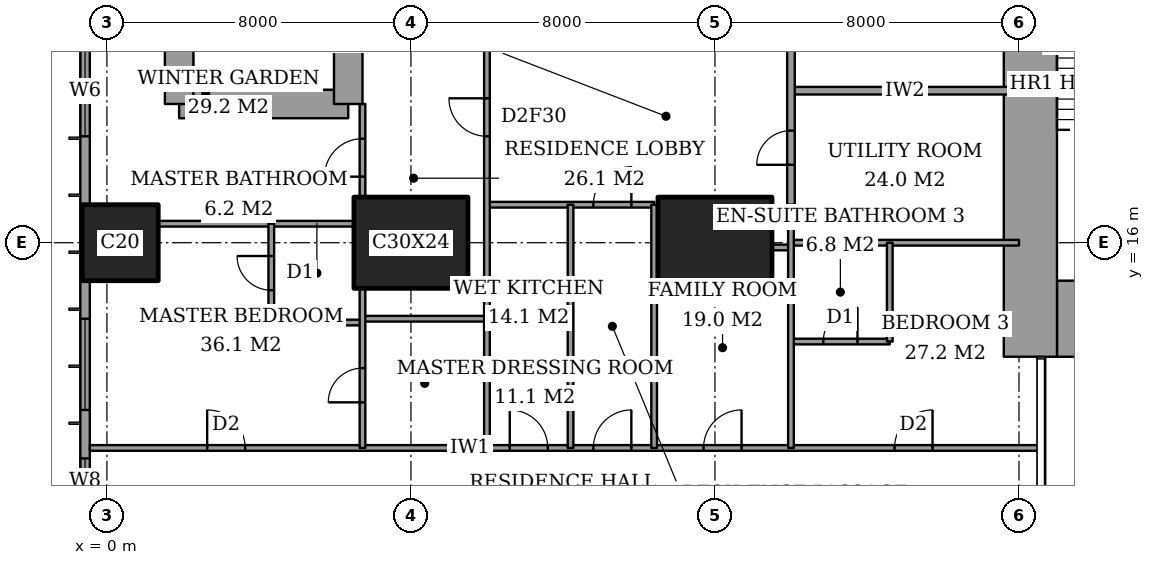
"""IFC4 building model, lengths in metres.
Left out: names, types, materials, properties, quantities, classifications, styles, units other than length and angle.
Written with IfcOpenShell. Run it as: python <this file> out.ifc"""

import sys

from ifc_helpers import new_model, si_unit, direction, frame, frame_2d, origin, origin_2d, place, context, subcontext, project, spatial, rectangle, extrude, element, fill, save


model = new_model("IFC4")
c1 = context("Model", 3, precision=1e-05, world=origin(), true_north=direction((0.0, 1.0)))
c2 = subcontext(c1, "Body", "Model", "MODEL_VIEW")
j1 = project(units=[si_unit("LENGTHUNIT", "METRE"), si_unit("PLANEANGLEUNIT", "RADIAN")], contexts=[c1])
p1 = place(None, origin())
s1 = spatial("IfcSite", under=j1, at=p1, CompositionType="ELEMENT")
p2 = place(p1, origin())
s2 = spatial("IfcBuilding", under=s1, at=p2, CompositionType="ELEMENT")
p3 = place(p2, frame((0.0, 0.0, 47.6)))
s3 = spatial("IfcBuildingStorey", under=s2, at=p3, CompositionType="ELEMENT", Elevation=47.6)
p4 = place(p3, frame((0.35, 16.0, 0.0), z_axis=(0.0, 0.0, 1.0), x_axis=(1.0, 0.0, 0.0)))
e1 = element("IfcColumn", 1, at=p4, inside=s3, PredefinedType="COLUMN", context=c2, shape_type="SweptSolid", body=[
    extrude(rectangle(XDim=2.0, YDim=2.0, at=origin_2d()), origin(), (0.0, 0.0, 1.0), 3.6),
])
for number, where, z_axis, x_axis in (
    (2, (8.0, 16.0, 0.0), (0.0, 0.0, 1.0), (1.0, 0.0, 0.0)),
    (3, (16.0, 16.0, 0.0), (0.0, 0.0, 1.0), (1.0, 0.0, 0.0)),
):
    element("IfcColumn", number, at=place(p3, frame(where, z_axis=z_axis, x_axis=x_axis)), inside=s3, PredefinedType="COLUMN", context=c2, shape_type="SweptSolid", body=[
        extrude(rectangle(XDim=3.0, YDim=2.4, at=origin_2d()), origin(), (0.0, 0.0, 1.0), 3.6),
    ])
p5 = place(p3, frame((25.0, 14.0, 0.0), z_axis=(0.0, 0.0, 1.0), x_axis=(1.0, 0.0, 0.0)))
e4 = element("IfcWall", 4, at=p5, inside=s3, PredefinedType="SHEAR", context=c2, shape_type="SweptSolid", body=[
    extrude(rectangle(XDim=3.15, YDim=2.0, at=frame_2d((1.575, 0.0))), origin(), (0.0, 0.0, 1.0), 3.6),
])
p6 = place(p3, frame((24.3, 13.0, 0.0), z_axis=(0.0, 0.0, 1.0), x_axis=(0.0, 1.0, 0.0)))
e5 = element("IfcWall", 5, at=p6, inside=s3, PredefinedType="SHEAR", context=c2, shape_type="SweptSolid", body=[
    extrude(rectangle(XDim=10.15, YDim=1.4, at=frame_2d((5.075, 0.0))), origin(), (0.0, 0.0, 1.0), 3.6),
])
p7 = place(p3, frame((1.9, 19.65, 0.0), z_axis=(0.0, 0.0, 1.0), x_axis=(1.0, 0.0, 0.0)))
e6 = element("IfcWall", 6, at=p7, inside=s3, PredefinedType="SHEAR", context=c2, shape_type="SweptSolid", body=[
    extrude(rectangle(XDim=4.45, YDim=0.75, at=frame_2d((2.225, 0.0))), origin(), (0.0, 0.0, 1.0), 3.6),
])
p8 = place(p3, frame((6.35, 19.65, 0.0), z_axis=(0.0, 0.0, 1.0), x_axis=(0.0, 1.0, 0.0)))
e7 = element("IfcWall", 7, at=p8, inside=s3, PredefinedType="SHEAR", context=c2, shape_type="SweptSolid", body=[
    extrude(rectangle(XDim=8.7, YDim=0.75, at=frame_2d((4.35, 0.0))), origin(), (0.0, 0.0, 1.0), 3.6),
])
p9 = place(p8, frame((6.725, 0.0, 0.0)))
e8 = element("IfcOpeningElement", 8, at=p9, cuts=e7, PredefinedType="OPENING", context=c2, shape_type="SweptSolid", body=[
    extrude(rectangle(XDim=1.0, YDim=2.1, at=frame_2d((0.5, 1.05))), frame((0.0, 0.385, 0.0), z_axis=(0.0, -1.0, 0.0), x_axis=(1.0, 0.0, 0.0)), (0.0, 0.0, 1.0), 0.77),
])
p10 = place(p3, frame((1.9, 28.35, 0.0), z_axis=(0.0, 0.0, 1.0), x_axis=(0.0, -1.0, 0.0)))
e9 = element("IfcWall", 9, at=p10, inside=s3, PredefinedType="SHEAR", context=c2, shape_type="SweptSolid", body=[
    extrude(rectangle(XDim=8.7, YDim=0.75, at=frame_2d((4.35, 0.0))), origin(), (0.0, 0.0, 1.0), 3.6),
])
p11 = place(p3, frame((-0.575, 44.825, 0.0), z_axis=(0.0, 0.0, 1.0), x_axis=(0.0, -1.0, 0.0)))
e10 = element("IfcWall", 10, at=p11, inside=s3, PredefinedType="SOLIDWALL", context=c2, shape_type="SweptSolid", body=[
    extrude(rectangle(XDim=41.65, YDim=0.25, at=frame_2d((20.825, 0.0))), origin(), (0.0, 0.0, 1.0), 3.6),
])
p12 = place(p11, frame((0.775, 0.0, 0.6)))
e11 = element("IfcOpeningElement", 11, at=p12, cuts=e10, PredefinedType="OPENING", context=c2, shape_type="SweptSolid", body=[
    extrude(rectangle(XDim=2.4, YDim=2.0, at=frame_2d((1.2, 1.0))), frame((0.0, 0.135, 0.0), z_axis=(0.0, -1.0, 0.0), x_axis=(1.0, 0.0, 0.0)), (0.0, 0.0, 1.0), 0.27),
])
p13 = place(p11, frame((6.1, 0.0, 0.6)))
e12 = element("IfcOpeningElement", 12, at=p13, cuts=e10, PredefinedType="OPENING", context=c2, shape_type="SweptSolid", body=[
    extrude(rectangle(XDim=1.2, YDim=2.0, at=frame_2d((0.6, 1.0))), frame((0.0, 0.135, 0.0), z_axis=(0.0, -1.0, 0.0), x_axis=(1.0, 0.0, 0.0)), (0.0, 0.0, 1.0), 0.27),
])
p14 = place(p11, frame((8.425, 0.0, 0.6)))
e13 = element("IfcOpeningElement", 13, at=p14, cuts=e10, PredefinedType="OPENING", context=c2, shape_type="SweptSolid", body=[
    extrude(rectangle(XDim=2.4, YDim=2.0, at=frame_2d((1.2, 1.0))), frame((0.0, 0.135, 0.0), z_axis=(0.0, -1.0, 0.0), x_axis=(1.0, 0.0, 0.0)), (0.0, 0.0, 1.0), 0.27),
])
p15 = place(p11, frame((15.625, 0.0, 0.6)))
e14 = element("IfcOpeningElement", 14, at=p15, cuts=e10, PredefinedType="OPENING", context=c2, shape_type="SweptSolid", body=[
    extrude(rectangle(XDim=2.4, YDim=2.0, at=frame_2d((1.2, 1.0))), frame((0.0, 0.135, 0.0), z_axis=(0.0, -1.0, 0.0), x_axis=(1.0, 0.0, 0.0)), (0.0, 0.0, 1.0), 0.27),
])
p16 = place(p11, frame((23.625, 0.0, 0.6)))
e15 = element("IfcOpeningElement", 15, at=p16, cuts=e10, PredefinedType="OPENING", context=c2, shape_type="SweptSolid", body=[
    extrude(rectangle(XDim=2.4, YDim=2.0, at=frame_2d((1.2, 1.0))), frame((0.0, 0.135, 0.0), z_axis=(0.0, -1.0, 0.0), x_axis=(1.0, 0.0, 0.0)), (0.0, 0.0, 1.0), 0.27),
])
p17 = place(p11, frame((30.825, 0.0, 0.6)))
e16 = element("IfcOpeningElement", 16, at=p17, cuts=e10, PredefinedType="OPENING", context=c2, shape_type="SweptSolid", body=[
    extrude(rectangle(XDim=2.4, YDim=2.0, at=frame_2d((1.2, 1.0))), frame((0.0, 0.135, 0.0), z_axis=(0.0, -1.0, 0.0), x_axis=(1.0, 0.0, 0.0)), (0.0, 0.0, 1.0), 0.27),
])
p18 = place(p11, frame((34.5, 0.0, 0.6)))
e17 = element("IfcOpeningElement", 17, at=p18, cuts=e10, PredefinedType="OPENING", context=c2, shape_type="SweptSolid", body=[
    extrude(rectangle(XDim=1.2, YDim=2.0, at=frame_2d((0.6, 1.0))), frame((0.0, 0.135, 0.0), z_axis=(0.0, -1.0, 0.0), x_axis=(1.0, 0.0, 0.0)), (0.0, 0.0, 1.0), 0.27),
])
p19 = place(p11, frame((38.475, 0.0, 0.6)))
e18 = element("IfcOpeningElement", 18, at=p19, cuts=e10, PredefinedType="OPENING", context=c2, shape_type="SweptSolid", body=[
    extrude(rectangle(XDim=2.4, YDim=2.0, at=frame_2d((1.2, 1.0))), frame((0.0, 0.135, 0.0), z_axis=(0.0, -1.0, 0.0), x_axis=(1.0, 0.0, 0.0)), (0.0, 0.0, 1.0), 0.27),
])
p20 = place(p3, frame((-0.45, 10.6, 0.0), z_axis=(0.0, 0.0, 1.0), x_axis=(1.0, 0.0, 0.0)))
e19 = element("IfcWall", 19, at=p20, inside=s3, PredefinedType="PARTITIONING", context=c2, shape_type="SweptSolid", body=[
    extrude(rectangle(XDim=25.011, YDim=0.15, at=frame_2d((12.505, 0.0))), origin(), (0.0, 0.0, 1.0), 3.35),
])
p21 = place(p20, frame((13.25, 0.0, 0.0)))
e20 = element("IfcOpeningElement", 20, at=p21, cuts=e19, PredefinedType="OPENING", context=c2, shape_type="SweptSolid", body=[
    extrude(rectangle(XDim=1.0, YDim=2.1, at=frame_2d((0.5, 1.05))), frame((0.0, 0.085, 0.0), z_axis=(0.0, -1.0, 0.0), x_axis=(1.0, 0.0, 0.0)), (0.0, 0.0, 1.0), 0.17),
])
p22 = place(p20, frame((3.087, 0.0, 0.0)))
e21 = element("IfcOpeningElement", 21, at=p22, cuts=e19, PredefinedType="OPENING", context=c2, shape_type="SweptSolid", body=[
    extrude(rectangle(XDim=1.0, YDim=2.1, at=frame_2d((0.5, 1.05))), frame((0.0, 0.085, 0.0), z_axis=(0.0, -1.0, 0.0), x_axis=(1.0, 0.0, 0.0)), (0.0, 0.0, 1.0), 0.17),
])
p23 = place(p20, frame((11.05, 0.0, 0.0)))
e22 = element("IfcOpeningElement", 22, at=p23, cuts=e19, PredefinedType="OPENING", context=c2, shape_type="SweptSolid", body=[
    extrude(rectangle(XDim=1.0, YDim=2.1, at=frame_2d((0.5, 1.05))), frame((0.0, 0.085, 0.0), z_axis=(0.0, -1.0, 0.0), x_axis=(1.0, 0.0, 0.0)), (0.0, 0.0, 1.0), 0.17),
])
p24 = place(p20, frame((16.15, 0.0, 0.0)))
e23 = element("IfcOpeningElement", 23, at=p24, cuts=e19, PredefinedType="OPENING", context=c2, shape_type="SweptSolid", body=[
    extrude(rectangle(XDim=1.0, YDim=2.1, at=frame_2d((0.5, 1.05))), frame((0.0, 0.085, 0.0), z_axis=(0.0, -1.0, 0.0), x_axis=(1.0, 0.0, 0.0)), (0.0, 0.0, 1.0), 0.17),
])
p25 = place(p20, frame((21.175, 0.0, 0.0)))
e24 = element("IfcOpeningElement", 24, at=p25, cuts=e19, PredefinedType="OPENING", context=c2, shape_type="SweptSolid", body=[
    extrude(rectangle(XDim=1.0, YDim=2.1, at=frame_2d((0.5, 1.05))), frame((0.0, 0.085, 0.0), z_axis=(0.0, -1.0, 0.0), x_axis=(1.0, 0.0, 0.0)), (0.0, 0.0, 1.0), 0.17),
])
p26 = place(p3, frame((18.0, 13.4, 0.0), z_axis=(0.0, 0.0, 1.0), x_axis=(1.0, 0.0, 0.0)))
e25 = element("IfcWall", 25, at=p26, inside=s3, PredefinedType="PARTITIONING", context=c2, shape_type="SweptSolid", body=[
    extrude(rectangle(XDim=2.6, YDim=0.15, at=frame_2d((1.3, 0.0))), origin(), (0.0, 0.0, 1.0), 3.35),
])
p27 = place(p26, frame((0.85, 0.0, 0.0)))
e26 = element("IfcOpeningElement", 26, at=p27, cuts=e25, PredefinedType="OPENING", context=c2, shape_type="SweptSolid", body=[
    extrude(rectangle(XDim=0.9, YDim=2.1, at=frame_2d((0.45, 1.05))), frame((0.0, 0.085, 0.0), z_axis=(0.0, -1.0, 0.0), x_axis=(1.0, 0.0, 0.0)), (0.0, 0.0, 1.0), 0.17),
])
p28 = place(p3, frame((4.325, 13.9, 0.0), z_axis=(0.0, 0.0, 1.0), x_axis=(1.0, 0.0, 0.0)))
e27 = element("IfcWall", 27, at=p28, inside=s3, PredefinedType="PARTITIONING", context=c2, shape_type="SweptSolid", body=[
    extrude(rectangle(XDim=2.4, YDim=0.15, at=frame_2d((1.2, 0.0))), origin(), (0.0, 0.0, 1.0), 3.35),
])
p29 = place(p3, frame((6.725, 14.0, 0.0), z_axis=(0.0, 0.0, 1.0), x_axis=(1.0, 0.0, 0.0)))
e28 = element("IfcWall", 28, at=p29, inside=s3, PredefinedType="PARTITIONING", context=c2, shape_type="SweptSolid", body=[
    extrude(rectangle(XDim=3.275, YDim=0.15, at=frame_2d((1.637, 0.0))), origin(), (0.0, 0.0, 1.0), 3.35),
])
p30 = place(p3, frame((17.5, 15.875, 0.0), z_axis=(0.0, 0.0, 1.0), x_axis=(1.0, 0.0, 0.0)))
e29 = element("IfcWall", 29, at=p30, inside=s3, PredefinedType="PARTITIONING", context=c2, shape_type="SweptSolid", body=[
    extrude(rectangle(XDim=0.5, YDim=0.15, at=frame_2d((0.25, 0.0))), origin(), (0.0, 0.0, 1.0), 2.634),
])
p31 = place(p3, frame((18.0, 16.0, 0.0), z_axis=(0.0, 0.0, 1.0), x_axis=(1.0, 0.0, 0.0)))
e30 = element("IfcWall", 30, at=p31, inside=s3, PredefinedType="PARTITIONING", context=c2, shape_type="SweptSolid", body=[
    extrude(rectangle(XDim=6.0, YDim=0.15, at=frame_2d((3.0, 0.0))), origin(), (0.0, 0.0, 1.0), 2.634),
])
p32 = place(p3, frame((1.35, 16.5, 0.0), z_axis=(0.0, 0.0, 1.0), x_axis=(1.0, 0.0, 0.0)))
e31 = element("IfcWall", 31, at=p32, inside=s3, PredefinedType="PARTITIONING", context=c2, shape_type="SweptSolid", body=[
    extrude(rectangle(XDim=5.15, YDim=0.15, at=frame_2d((2.575, 0.0))), origin(), (0.0, 0.0, 1.0), 3.35),
])
p33 = place(p3, frame((10.0, 17.0, 0.0), z_axis=(0.0, 0.0, 1.0), x_axis=(1.0, 0.0, 0.0)))
e32 = element("IfcWall", 32, at=p33, inside=s3, PredefinedType="PARTITIONING", context=c2, shape_type="SweptSolid", body=[
    extrude(rectangle(XDim=4.4, YDim=0.15, at=frame_2d((2.2, 0.0))), origin(), (0.0, 0.0, 1.0), 3.35),
])
p34 = place(p33, frame((2.8, 0.0, 0.0)))
e33 = element("IfcOpeningElement", 33, at=p34, cuts=e32, PredefinedType="OPENING", context=c2, shape_type="SweptSolid", body=[
    extrude(rectangle(XDim=1.0, YDim=2.1, at=frame_2d((0.5, 1.05))), frame((0.0, 0.085, 0.0), z_axis=(0.0, -1.0, 0.0), x_axis=(1.0, 0.0, 0.0)), (0.0, 0.0, 1.0), 0.17),
])
p35 = place(p3, frame((18.0, 20.0, 0.0), z_axis=(0.0, 0.0, 1.0), x_axis=(1.0, 0.0, 0.0)))
e34 = element("IfcWall", 34, at=p35, inside=s3, PredefinedType="PARTITIONING", context=c2, shape_type="SweptSolid", body=[
    extrude(rectangle(XDim=6.0, YDim=0.2, at=frame_2d((3.0, 0.0))), origin(), (0.0, 0.0, 1.0), 3.35),
])
p36 = place(p3, frame((4.325, 13.9, 0.0), z_axis=(0.0, 0.0, 1.0), x_axis=(0.0, 1.0, 0.0)))
e35 = element("IfcWall", 35, at=p36, inside=s3, PredefinedType="PARTITIONING", context=c2, shape_type="SweptSolid", body=[
    extrude(rectangle(XDim=2.6, YDim=0.15, at=frame_2d((1.3, 0.0))), origin(), (0.0, 0.0, 1.0), 3.35),
])
p37 = place(p36, frame((0.85, 0.0, 0.0)))
e36 = element("IfcOpeningElement", 36, at=p37, cuts=e35, PredefinedType="OPENING", context=c2, shape_type="SweptSolid", body=[
    extrude(rectangle(XDim=0.9, YDim=2.1, at=frame_2d((0.45, 1.05))), frame((0.0, 0.085, 0.0), z_axis=(0.0, -1.0, 0.0), x_axis=(1.0, 0.0, 0.0)), (0.0, 0.0, 1.0), 0.17),
])
p38 = place(p3, frame((6.725, 10.6, 0.0), z_axis=(0.0, 0.0, 1.0), x_axis=(0.0, 1.0, 0.0)))
e37 = element("IfcWall", 37, at=p38, inside=s3, PredefinedType="PARTITIONING", context=c2, shape_type="SweptSolid", body=[
    extrude(rectangle(XDim=4.2, YDim=0.15, at=frame_2d((2.1, 0.0))), origin(), (0.0, 0.0, 1.0), 3.35),
])
p39 = place(p38, frame((1.2, 0.0, 0.0)))
e38 = element("IfcOpeningElement", 38, at=p39, cuts=e37, PredefinedType="OPENING", context=c2, shape_type="SweptSolid", body=[
    extrude(rectangle(XDim=0.9, YDim=2.1, at=frame_2d((0.45, 1.05))), frame((0.0, 0.085, 0.0), z_axis=(0.0, -1.0, 0.0), x_axis=(1.0, 0.0, 0.0)), (0.0, 0.0, 1.0), 0.17),
])
p40 = place(p3, frame((6.725, 17.2, 0.0), z_axis=(0.0, 0.0, 1.0), x_axis=(0.0, 1.0, 0.0)))
e39 = element("IfcWall", 39, at=p40, inside=s3, PredefinedType="PARTITIONING", context=c2, shape_type="SweptSolid", body=[
    extrude(rectangle(XDim=2.45, YDim=0.15, at=frame_2d((1.225, 0.0))), origin(), (0.0, 0.0, 1.0), 3.35),
])
p41 = place(p40, frame((0.538, 0.0, 0.0)))
e40 = element("IfcOpeningElement", 40, at=p41, cuts=e39, PredefinedType="OPENING", context=c2, shape_type="SweptSolid", body=[
    extrude(rectangle(XDim=1.0, YDim=2.1, at=frame_2d((0.5, 1.05))), frame((0.0, 0.085, 0.0), z_axis=(0.0, -1.0, 0.0), x_axis=(1.0, 0.0, 0.0)), (0.0, 0.0, 1.0), 0.17),
])
p42 = place(p3, frame((10.0, 10.6, 0.0), z_axis=(0.0, 0.0, 1.0), x_axis=(0.0, 1.0, 0.0)))
e41 = element("IfcWall", 41, at=p42, inside=s3, PredefinedType="PARTITIONING", context=c2, shape_type="SweptSolid", body=[
    extrude(rectangle(XDim=11.0, YDim=0.15, at=frame_2d((5.5, 0.0))), origin(), (0.0, 0.0, 1.0), 3.35),
])
p43 = place(p42, frame((8.2, 0.0, 0.0)))
e42 = element("IfcOpeningElement", 42, at=p43, cuts=e41, PredefinedType="OPENING", context=c2, shape_type="SweptSolid", body=[
    extrude(rectangle(XDim=1.0, YDim=2.1, at=frame_2d((0.5, 1.05))), frame((0.0, 0.085, 0.0), z_axis=(0.0, -1.0, 0.0), x_axis=(1.0, 0.0, 0.0)), (0.0, 0.0, 1.0), 0.17),
])
for number, where, z_axis, x_axis in (
    (43, (12.2, 10.6, 0.0), (0.0, 0.0, 1.0), (0.0, 1.0, 0.0)),
    (44, (14.4, 10.6, 0.0), (0.0, 0.0, 1.0), (0.0, 1.0, 0.0)),
):
    element("IfcWall", number, at=place(p3, frame(where, z_axis=z_axis, x_axis=x_axis)), inside=s3, PredefinedType="PARTITIONING", context=c2, shape_type="SweptSolid", body=[
        extrude(rectangle(XDim=6.4, YDim=0.15, at=frame_2d((3.2, 0.0))), origin(), (0.0, 0.0, 1.0), 3.35),
    ])
p44 = place(p3, frame((18.0, 17.0, 0.0), z_axis=(0.0, 0.0, 1.0), x_axis=(0.0, 1.0, 0.0)))
e45 = element("IfcWall", 45, at=p44, inside=s3, PredefinedType="PARTITIONING", context=c2, shape_type="SweptSolid", body=[
    extrude(rectangle(XDim=7.0, YDim=0.2, at=frame_2d((3.5, 0.0))), origin(), (0.0, 0.0, 1.0), 3.35),
])
p45 = place(p44, frame((4.4, 0.0, 0.0)))
e46 = element("IfcOpeningElement", 46, at=p45, cuts=e45, PredefinedType="OPENING", context=c2, shape_type="SweptSolid", body=[
    extrude(rectangle(XDim=1.2, YDim=2.4, at=frame_2d((0.6, 1.2))), frame((0.0, 0.11, 0.0), z_axis=(0.0, -1.0, 0.0), x_axis=(1.0, 0.0, 0.0)), (0.0, 0.0, 1.0), 0.22),
])
p46 = place(p44, frame((1.05, 0.0, 0.0)))
e47 = element("IfcOpeningElement", 47, at=p46, cuts=e45, PredefinedType="OPENING", context=c2, shape_type="SweptSolid", body=[
    extrude(rectangle(XDim=0.9, YDim=2.1, at=frame_2d((0.45, 1.05))), frame((0.0, 0.11, 0.0), z_axis=(0.0, -1.0, 0.0), x_axis=(1.0, 0.0, 0.0)), (0.0, 0.0, 1.0), 0.22),
])
p47 = place(p3, frame((18.0, 10.6, 0.0), z_axis=(0.0, 0.0, 1.0), x_axis=(0.0, 1.0, 0.0)))
e48 = element("IfcWall", 48, at=p47, inside=s3, PredefinedType="PARTITIONING", context=c2, shape_type="SweptSolid", body=[
    extrude(rectangle(XDim=6.4, YDim=0.15, at=frame_2d((3.2, 0.0))), origin(), (0.0, 0.0, 1.0), 3.35),
])
p48 = place(p3, frame((20.6, 13.4, 0.0), z_axis=(0.0, 0.0, 1.0), x_axis=(0.0, 1.0, 0.0)))
e49 = element("IfcWall", 49, at=p48, inside=s3, PredefinedType="PARTITIONING", context=c2, shape_type="SweptSolid", body=[
    extrude(rectangle(XDim=2.6, YDim=0.15, at=frame_2d((1.3, 0.0))), origin(), (0.0, 0.0, 1.0), 3.35),
])
p49 = place(p16, origin())
e50 = element("IfcWindow", 50, at=p49, inside=s3, PartitioningType="SINGLE_PANEL", PredefinedType="WINDOW", context=c2, shape_type="SweptSolid", body=[
    extrude(rectangle(XDim=2.4, YDim=2.0, at=frame_2d((1.2, 1.0))), frame((0.0, 0.03, 0.0), z_axis=(0.0, -1.0, 0.0), x_axis=(1.0, 0.0, 0.0)), (0.0, 0.0, 1.0), 0.06),
])
fill(e15, e50)
p50 = place(p17, origin())
e51 = element("IfcWindow", 51, at=p50, inside=s3, PartitioningType="SINGLE_PANEL", PredefinedType="WINDOW", context=c2, shape_type="SweptSolid", body=[
    extrude(rectangle(XDim=2.4, YDim=2.0, at=frame_2d((1.2, 1.0))), frame((0.0, 0.03, 0.0), z_axis=(0.0, -1.0, 0.0), x_axis=(1.0, 0.0, 0.0)), (0.0, 0.0, 1.0), 0.06),
])
fill(e16, e51)
p51 = place(p18, origin())
e52 = element("IfcWindow", 52, at=p51, inside=s3, PartitioningType="SINGLE_PANEL", PredefinedType="WINDOW", context=c2, shape_type="SweptSolid", body=[
    extrude(rectangle(XDim=1.2, YDim=2.0, at=frame_2d((0.6, 1.0))), frame((0.0, 0.03, 0.0), z_axis=(0.0, -1.0, 0.0), x_axis=(1.0, 0.0, 0.0)), (0.0, 0.0, 1.0), 0.06),
])
fill(e17, e52)
p52 = place(p21, origin())
e53 = element("IfcDoor", 53, at=p52, inside=s3, OperationType="SINGLE_SWING_LEFT", PredefinedType="DOOR", context=c2, shape_type="SweptSolid", body=[
    extrude(rectangle(XDim=1.0, YDim=2.1, at=frame_2d((0.5, 1.05))), frame((0.0, 0.025, 0.0), z_axis=(0.0, -1.0, 0.0), x_axis=(1.0, 0.0, 0.0)), (0.0, 0.0, 1.0), 0.05),
])
fill(e20, e53)
p53 = place(p37, origin())
e54 = element("IfcDoor", 54, at=p53, inside=s3, OperationType="SINGLE_SWING_LEFT", PredefinedType="DOOR", context=c2, shape_type="SweptSolid", body=[
    extrude(rectangle(XDim=0.9, YDim=2.1, at=frame_2d((0.45, 1.05))), frame((0.0, 0.025, 0.0), z_axis=(0.0, -1.0, 0.0), x_axis=(1.0, 0.0, 0.0)), (0.0, 0.0, 1.0), 0.05),
])
fill(e36, e54)
p54 = place(p22, origin())
e55 = element("IfcDoor", 55, at=p54, inside=s3, OperationType="SINGLE_SWING_RIGHT", PredefinedType="DOOR", context=c2, shape_type="SweptSolid", body=[
    extrude(rectangle(XDim=1.0, YDim=2.1, at=frame_2d((0.5, 1.05))), frame((0.0, 0.025, 0.0), z_axis=(0.0, -1.0, 0.0), x_axis=(1.0, 0.0, 0.0)), (0.0, 0.0, 1.0), 0.05),
])
fill(e21, e55)
p55 = place(p41, origin())
e56 = element("IfcDoor", 56, at=p55, inside=s3, OperationType="SINGLE_SWING_RIGHT", PredefinedType="DOOR", context=c2, shape_type="SweptSolid", body=[
    extrude(rectangle(XDim=1.0, YDim=2.1, at=frame_2d((0.5, 1.05))), frame((0.0, 0.025, 0.0), z_axis=(0.0, -1.0, 0.0), x_axis=(1.0, 0.0, 0.0)), (0.0, 0.0, 1.0), 0.05),
])
fill(e40, e56)
p56 = place(p39, origin())
e57 = element("IfcDoor", 57, at=p56, inside=s3, OperationType="SINGLE_SWING_RIGHT", PredefinedType="DOOR", context=c2, shape_type="SweptSolid", body=[
    extrude(rectangle(XDim=0.9, YDim=2.1, at=frame_2d((0.45, 1.05))), frame((0.0, 0.025, 0.0), z_axis=(0.0, -1.0, 0.0), x_axis=(1.0, 0.0, 0.0)), (0.0, 0.0, 1.0), 0.05),
])
fill(e38, e57)
p57 = place(p43, origin())
e58 = element("IfcDoor", 58, at=p57, inside=s3, OperationType="SINGLE_SWING_LEFT", PredefinedType="DOOR", context=c2, shape_type="SweptSolid", body=[
    extrude(rectangle(XDim=1.0, YDim=2.1, at=frame_2d((0.5, 1.05))), frame((0.0, 0.025, 0.0), z_axis=(0.0, -1.0, 0.0), x_axis=(1.0, 0.0, 0.0)), (0.0, 0.0, 1.0), 0.05),
])
fill(e42, e58)
p58 = place(p23, origin())
e59 = element("IfcDoor", 59, at=p58, inside=s3, OperationType="SINGLE_SWING_RIGHT", PredefinedType="DOOR", context=c2, shape_type="SweptSolid", body=[
    extrude(rectangle(XDim=1.0, YDim=2.1, at=frame_2d((0.5, 1.05))), frame((0.0, 0.025, 0.0), z_axis=(0.0, -1.0, 0.0), x_axis=(1.0, 0.0, 0.0)), (0.0, 0.0, 1.0), 0.05),
])
fill(e22, e59)
p59 = place(p34, origin())
e60 = element("IfcDoor", 60, at=p59, inside=s3, OperationType="SINGLE_SWING_LEFT", PredefinedType="DOOR", context=c2, shape_type="SweptSolid", body=[
    extrude(rectangle(XDim=1.0, YDim=2.1, at=frame_2d((0.5, 1.05))), frame((0.0, 0.025, 0.0), z_axis=(0.0, -1.0, 0.0), x_axis=(1.0, 0.0, 0.0)), (0.0, 0.0, 1.0), 0.05),
])
fill(e33, e60)
p60 = place(p24, origin())
e61 = element("IfcDoor", 61, at=p60, inside=s3, OperationType="SINGLE_SWING_LEFT", PredefinedType="DOOR", context=c2, shape_type="SweptSolid", body=[
    extrude(rectangle(XDim=1.0, YDim=2.1, at=frame_2d((0.5, 1.05))), frame((0.0, 0.025, 0.0), z_axis=(0.0, -1.0, 0.0), x_axis=(1.0, 0.0, 0.0)), (0.0, 0.0, 1.0), 0.05),
])
fill(e23, e61)
p61 = place(p27, origin())
e62 = element("IfcDoor", 62, at=p61, inside=s3, OperationType="SINGLE_SWING_LEFT", PredefinedType="DOOR", context=c2, shape_type="SweptSolid", body=[
    extrude(rectangle(XDim=0.9, YDim=2.1, at=frame_2d((0.45, 1.05))), frame((0.0, 0.025, 0.0), z_axis=(0.0, -1.0, 0.0), x_axis=(1.0, 0.0, 0.0)), (0.0, 0.0, 1.0), 0.05),
])
fill(e26, e62)
p62 = place(p25, origin())
e63 = element("IfcDoor", 63, at=p62, inside=s3, OperationType="SINGLE_SWING_LEFT", PredefinedType="DOOR", context=c2, shape_type="SweptSolid", body=[
    extrude(rectangle(XDim=1.0, YDim=2.1, at=frame_2d((0.5, 1.05))), frame((0.0, 0.025, 0.0), z_axis=(0.0, -1.0, 0.0), x_axis=(1.0, 0.0, 0.0)), (0.0, 0.0, 1.0), 0.05),
])
fill(e24, e63)
p63 = place(p46, origin())
e64 = element("IfcDoor", 64, at=p63, inside=s3, OperationType="SINGLE_SWING_RIGHT", PredefinedType="DOOR", context=c2, shape_type="SweptSolid", body=[
    extrude(rectangle(XDim=0.9, YDim=2.1, at=frame_2d((0.45, 1.05))), frame((0.0, 0.025, 0.0), z_axis=(0.0, -1.0, 0.0), x_axis=(1.0, 0.0, 0.0)), (0.0, 0.0, 1.0), 0.05),
])
fill(e47, e64)
save(model, sys.argv[1])
